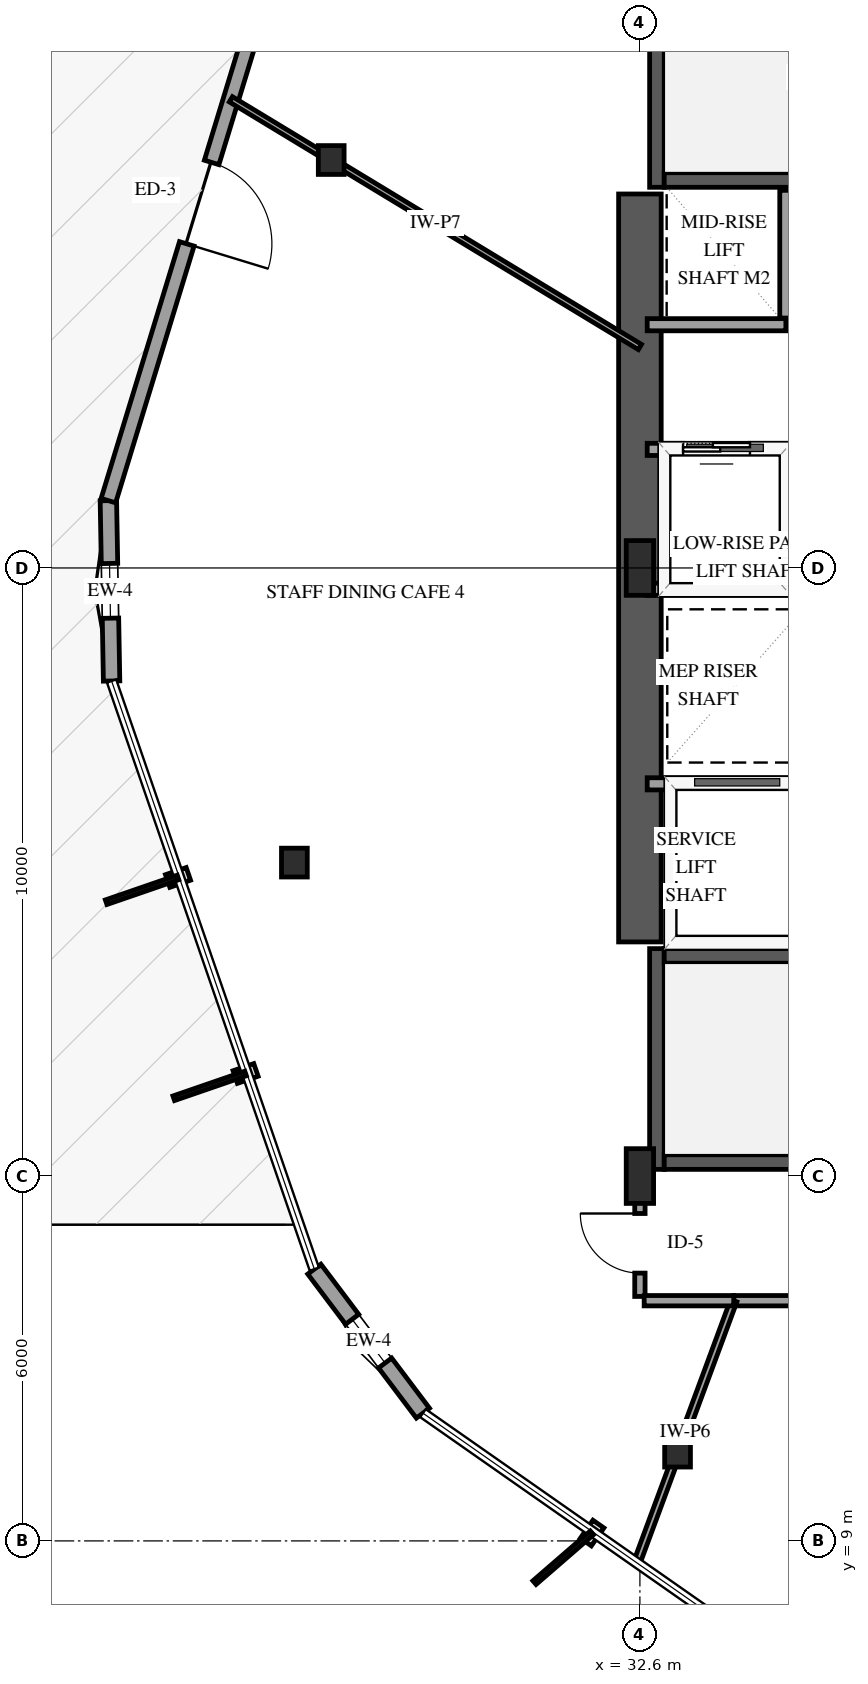
"""IFC4 building model, lengths in metres.
Left out: names, types, materials, properties, quantities, classifications, styles, units other than length and angle.
Written with IfcOpenShell. Run it as: python <this file> out.ifc"""

import sys

from ifc_helpers import new_model, si_unit, direction, frame, frame_2d, origin, origin_2d, place, context, subcontext, project, spatial, rectangle, i_section, extrude, element, fill, save


model = new_model("IFC4")
c1 = context("Model", 3, precision=1e-05, world=origin(), true_north=direction((0.0, 1.0)))
c2 = subcontext(c1, "Body", "Model", "MODEL_VIEW")
j1 = project(units=[si_unit("LENGTHUNIT", "METRE"), si_unit("PLANEANGLEUNIT", "RADIAN")], contexts=[c1])
p1 = place(None, origin())
s1 = spatial("IfcSite", under=j1, at=p1, CompositionType="ELEMENT")
p2 = place(p1, origin())
s2 = spatial("IfcBuilding", under=s1, at=p2, CompositionType="ELEMENT")
p3 = place(p2, frame((0.0, 0.0, 30.6)))
s3 = spatial("IfcBuildingStorey", under=s2, at=p3, CompositionType="ELEMENT", Elevation=30.6)
p4 = place(p3, frame((32.88, 15.11, 0.0), z_axis=(0.0, 0.0, 1.0), x_axis=(0.0, 1.0, 0.0)))
e1 = element("IfcWall", 1, at=p4, inside=s3, PredefinedType="SHEAR", context=c2, shape_type="SweptSolid", body=[
    extrude(rectangle(XDim=3.63, YDim=0.24, at=frame_2d((1.815, 0.0))), origin(), (0.0, 0.0, 1.0), 4.0),
])
for number, where, z_axis, x_axis in (
    (2, (33.0, 15.23, 0.0), (0.0, 0.0, 1.0), (1.0, 0.0, 0.0)),
    (3, (33.0, 18.62, 0.0), (0.0, 0.0, 1.0), (1.0, 0.0, 0.0)),
):
    element("IfcWall", number, at=place(p3, frame(where, z_axis=z_axis, x_axis=x_axis)), inside=s3, PredefinedType="SHEAR", context=c2, shape_type="SweptSolid", body=[
        extrude(rectangle(XDim=8.0, YDim=0.24, at=frame_2d((4.0, 0.0))), origin(), (0.0, 0.0, 1.0), 4.0),
    ])
p5 = place(p3, frame((32.88, 31.26, 0.0), z_axis=(0.0, 0.0, 1.0), x_axis=(0.0, 1.0, 0.0)))
e4 = element("IfcWall", 4, at=p5, inside=s3, PredefinedType="SHEAR", context=c2, shape_type="SweptSolid", body=[
    extrude(rectangle(XDim=3.63, YDim=0.24, at=frame_2d((1.815, 0.0))), origin(), (0.0, 0.0, 1.0), 4.0),
])
p6 = place(p3, frame((33.0, 31.38, 0.0), z_axis=(0.0, 0.0, 1.0), x_axis=(1.0, 0.0, 0.0)))
e5 = element("IfcWall", 5, at=p6, inside=s3, PredefinedType="SHEAR", context=c2, shape_type="SweptSolid", body=[
    extrude(rectangle(XDim=8.0, YDim=0.24, at=frame_2d((4.0, 0.0))), origin(), (0.0, 0.0, 1.0), 4.0),
])
p7 = place(p3, frame((32.6, 18.85, 0.0), z_axis=(0.0, 0.0, 1.0), x_axis=(0.0, 1.0, 0.0)))
e6 = element("IfcWall", 6, at=p7, inside=s3, PredefinedType="SHEAR", context=c2, shape_type="SweptSolid", body=[
    extrude(rectangle(XDim=12.3, YDim=0.7, at=frame_2d((6.15, 0.0))), origin(), (0.0, 0.0, 1.0), 4.0),
])
for number, where, z_axis, x_axis in (
    (7, (32.6, 15.0, -0.3), (0.0, 0.0, 1.0), (1.0, 0.0, 0.0)),
    (8, (32.6, 25.0, -0.3), (0.0, 0.0, 1.0), (1.0, 0.0, 0.0)),
):
    element("IfcColumn", number, at=place(p3, frame(where, z_axis=z_axis, x_axis=x_axis)), inside=s3, PredefinedType="PILASTER", context=c2, shape_type="SweptSolid", body=[
        extrude(rectangle(XDim=0.45, YDim=0.9, at=origin_2d()), origin(), (0.0, 0.0, 1.0), 4.3),
    ])
for number, where, z_axis, x_axis in (
    (9, (27.523, 31.708, -0.3), (0.0, 0.0, 1.0), (1.0, 0.0, 0.0)),
    (10, (26.918, 20.155, -0.3), (0.0, 0.0, 1.0), (1.0, 0.0, 0.0)),
    (11, (33.219, 10.452, -0.3), (0.0, 0.0, 1.0), (1.0, 0.0, 0.0)),
):
    element("IfcColumn", number, at=place(p3, frame(where, z_axis=z_axis, x_axis=x_axis)), inside=s3, PredefinedType="COLUMN", context=c2, shape_type="SweptSolid", body=[
        extrude(i_section(OverallWidth=0.424, OverallDepth=0.474, WebThickness=0.048, FlangeThickness=0.077, FilletRadius=0.038, at=origin_2d()), origin(), (0.0, 0.0, 1.0), 4.3),
    ])
p8 = place(p3, frame((23.859, 26.107, 0.0), z_axis=(0.0, 0.0, 1.0), x_axis=(0.017776431734, -0.999841986753, 0.0)))
e12 = element("IfcWall", 12, at=p8, inside=s3, PredefinedType="SOLIDWALL", context=c2, shape_type="SweptSolid", body=[
    extrude(rectangle(XDim=2.967, YDim=0.27, at=frame_2d((1.483, 0.0))), origin(), (0.0, 0.0, 1.0), 3.079),
])
p9 = place(p8, frame((1.033, 0.0, 0.75)))
e13 = element("IfcOpeningElement", 13, at=p9, cuts=e12, PredefinedType="OPENING", context=c2, shape_type="SweptSolid", body=[
    extrude(rectangle(XDim=0.9, YDim=1.5, at=frame_2d((0.45, 0.75))), frame((0.0, 0.145, 0.0), z_axis=(0.0, -1.0, 0.0), x_axis=(1.0, 0.0, 0.0)), (0.0, 0.0, 1.0), 0.29),
])
p10 = place(p3, frame((26.846, 35.891, 0.0), z_axis=(0.0, 0.0, 1.0), x_axis=(-0.292034213335, -0.956407872323, 0.0)))
e14 = element("IfcWall", 14, at=p10, inside=s3, PredefinedType="SOLIDWALL", context=c2, shape_type="SweptSolid", body=[
    extrude(rectangle(XDim=10.23, YDim=0.25, at=frame_2d((5.115, 0.0))), origin(), (0.0, 0.0, 1.0), 3.079),
])
p11 = place(p10, frame((4.415, 0.0, 0.0)))
e15 = element("IfcOpeningElement", 15, at=p11, cuts=e14, PredefinedType="OPENING", context=c2, shape_type="SweptSolid", body=[
    extrude(rectangle(XDim=1.4, YDim=2.2, at=frame_2d((0.7, 1.1))), frame((0.0, 0.135, 0.0), z_axis=(0.0, -1.0, 0.0), x_axis=(1.0, 0.0, 0.0)), (0.0, 0.0, 1.0), 0.27),
])
p12 = place(p3, frame((27.246, 13.469, 0.0), z_axis=(0.0, 0.0, 1.0), x_axis=(0.602130877059, -0.798397399102, 0.0)))
e16 = element("IfcWall", 16, at=p12, inside=s3, PredefinedType="SOLIDWALL", context=c2, shape_type="SweptSolid", body=[
    extrude(rectangle(XDim=2.967, YDim=0.27, at=frame_2d((1.483, 0.0))), origin(), (0.0, 0.0, 1.0), 3.079),
])
p13 = place(p12, frame((1.033, 0.0, 0.75)))
e17 = element("IfcOpeningElement", 17, at=p13, cuts=e16, PredefinedType="OPENING", context=c2, shape_type="SweptSolid", body=[
    extrude(rectangle(XDim=0.9, YDim=1.5, at=frame_2d((0.45, 0.75))), frame((0.0, 0.145, 0.0), z_axis=(0.0, -1.0, 0.0), x_axis=(1.0, 0.0, 0.0)), (0.0, 0.0, 1.0), 0.29),
])
p14 = place(p3, frame((32.72, 21.45, 0.0), z_axis=(0.0, 0.0, 1.0), x_axis=(1.0, 0.0, 0.0)))
e18 = element("IfcWall", 18, at=p14, inside=s3, PredefinedType="SOLIDWALL", context=c2, shape_type="SweptSolid", body=[
    extrude(rectangle(XDim=2.58, YDim=0.2, at=frame_2d((1.29, 0.0))), origin(), (0.0, 0.0, 1.0), 3.7),
])
p15 = place(p3, frame((32.72, 24.65, 0.0), z_axis=(0.0, 0.0, 1.0), x_axis=(1.0, 0.0, 0.0)))
e19 = element("IfcWall", 19, at=p15, inside=s3, PredefinedType="SOLIDWALL", context=c2, shape_type="SweptSolid", body=[
    extrude(rectangle(XDim=2.28, YDim=0.2, at=frame_2d((1.14, 0.0))), origin(), (0.0, 0.0, 1.0), 3.7),
])
p16 = place(p3, frame((32.72, 26.95, 0.0), z_axis=(0.0, 0.0, 1.0), x_axis=(1.0, 0.0, 0.0)))
e20 = element("IfcWall", 20, at=p16, inside=s3, PredefinedType="SOLIDWALL", context=c2, shape_type="SweptSolid", body=[
    extrude(rectangle(XDim=2.28, YDim=0.2, at=frame_2d((1.14, 0.0))), origin(), (0.0, 0.0, 1.0), 3.7),
])
p17 = place(p16, frame((0.59, 0.0, 0.0)))
e21 = element("IfcOpeningElement", 21, at=p17, cuts=e20, PredefinedType="OPENING", context=c2, shape_type="SweptSolid", body=[
    extrude(rectangle(XDim=1.1, YDim=2.15, at=frame_2d((0.55, 1.075))), frame((0.0, 0.11, 0.0), z_axis=(0.0, -1.0, 0.0), x_axis=(1.0, 0.0, 0.0)), (0.0, 0.0, 1.0), 0.22),
])
p18 = place(p3, frame((35.0, 24.76, 0.0), z_axis=(0.0, 0.0, 1.0), x_axis=(0.0, 1.0, 0.0)))
e22 = element("IfcWall", 22, at=p18, inside=s3, PredefinedType="SOLIDWALL", context=c2, shape_type="SweptSolid", body=[
    extrude(rectangle(XDim=2.08, YDim=0.2, at=frame_2d((1.04, 0.0))), origin(), (0.0, 0.0, 1.0), 3.7),
])
p19 = place(p3, frame((32.72, 29.0, 0.0), z_axis=(0.0, 0.0, 1.0), x_axis=(1.0, 0.0, 0.0)))
e23 = element("IfcWall", 23, at=p19, inside=s3, PredefinedType="SOLIDWALL", context=c2, shape_type="SweptSolid", body=[
    extrude(rectangle(XDim=2.28, YDim=0.2, at=frame_2d((1.14, 0.0))), origin(), (0.0, 0.0, 1.0), 3.7),
])
p20 = place(p3, frame((35.0, 29.11, 0.0), z_axis=(0.0, 0.0, 1.0), x_axis=(0.0, 1.0, 0.0)))
e24 = element("IfcWall", 24, at=p20, inside=s3, PredefinedType="SOLIDWALL", context=c2, shape_type="SweptSolid", body=[
    extrude(rectangle(XDim=2.1, YDim=0.2, at=frame_2d((1.05, 0.0))), origin(), (0.0, 0.0, 1.0), 3.7),
])
p21 = place(p3, frame((42.094, 12.95, 0.0), z_axis=(0.0, 0.0, 1.0), x_axis=(-1.0, 0.0, 0.0)))
e25 = element("IfcWall", 25, at=p21, inside=s3, PredefinedType="PARTITIONING", context=c2, shape_type="SweptSolid", body=[
    extrude(rectangle(XDim=7.951, YDim=0.17, at=frame_2d((3.976, 0.0))), origin(), (0.0, 0.0, 1.0), 3.7),
])
p22 = place(p21, frame((3.501, 0.0, 0.0)))
e26 = element("IfcOpeningElement", 26, at=p22, cuts=e25, PredefinedType="OPENING", context=c2, shape_type="SweptSolid", body=[
    extrude(rectangle(XDim=0.98, YDim=2.15, at=frame_2d((0.49, 1.075))), frame((0.0, 0.095, 0.0), z_axis=(0.0, -1.0, 0.0), x_axis=(1.0, 0.0, 0.0)), (0.0, 0.0, 1.0), 0.19),
])
p23 = place(p3, frame((32.6, 28.634, 0.0), z_axis=(0.0, 0.0, 1.0), x_axis=(-0.855390028233, 0.517984458839, 0.0)))
e27 = element("IfcWall", 27, at=p23, inside=s3, PredefinedType="PARTITIONING", context=c2, shape_type="SweptSolid", body=[
    extrude(rectangle(XDim=7.863, YDim=0.1, at=frame_2d((3.932, 0.0))), origin(), (0.0, 0.0, 1.0), 3.074),
])
p24 = place(p3, frame((34.143, 12.95, 0.0), z_axis=(0.0, 0.0, 1.0), x_axis=(-0.3470565426, -0.937844206805, 0.0)))
e28 = element("IfcWall", 28, at=p24, inside=s3, PredefinedType="PARTITIONING", context=c2, shape_type="SweptSolid", body=[
    extrude(rectangle(XDim=4.596, YDim=0.11, at=frame_2d((2.298, 0.0))), origin(), (0.0, 0.0, 1.0), 2.995),
])
p25 = place(p3, frame((32.6, 13.02, 0.0), z_axis=(0.0, 0.0, 1.0), x_axis=(0.0, 1.0, 0.0)))
e29 = element("IfcWall", 29, at=p25, inside=s3, PredefinedType="PARTITIONING", context=c2, shape_type="SweptSolid", body=[
    extrude(rectangle(XDim=1.91, YDim=0.17, at=frame_2d((0.955, 0.0))), origin(), (0.0, 0.0, 1.0), 3.7),
])
p26 = place(p25, frame((0.384, 0.0, 0.0)))
e30 = element("IfcOpeningElement", 30, at=p26, cuts=e29, PredefinedType="OPENING", context=c2, shape_type="SweptSolid", body=[
    extrude(rectangle(XDim=0.98, YDim=2.15, at=frame_2d((0.49, 1.075))), frame((0.0, 0.095, 0.0), z_axis=(0.0, -1.0, 0.0), x_axis=(1.0, 0.0, 0.0)), (0.0, 0.0, 1.0), 0.19),
])
p27 = place(p3, frame((34.143, 12.95, 0.0), z_axis=(0.0, 0.0, 1.0), x_axis=(-1.0, 0.0, 0.0)))
e31 = element("IfcWall", 31, at=p27, inside=s3, PredefinedType="PARTITIONING", context=c2, shape_type="SweptSolid", body=[
    extrude(rectangle(XDim=1.473, YDim=0.17, at=frame_2d((0.737, 0.0))), origin(), (0.0, 0.0, 1.0), 3.7),
])
p28 = place(p9, origin())
e32 = element("IfcWindow", 32, at=p28, inside=s3, PartitioningType="SINGLE_PANEL", PredefinedType="WINDOW", context=c2, shape_type="SweptSolid", body=[
    extrude(rectangle(XDim=0.9, YDim=1.5, at=frame_2d((0.45, 0.75))), frame((0.0, 0.03, 0.0), z_axis=(0.0, -1.0, 0.0), x_axis=(1.0, 0.0, 0.0)), (0.0, 0.0, 1.0), 0.06),
])
fill(e13, e32)
p29 = place(p11, origin())
e33 = element("IfcDoor", 33, at=p29, inside=s3, OperationType="SINGLE_SWING_RIGHT", PredefinedType="DOOR", context=c2, shape_type="SweptSolid", body=[
    extrude(rectangle(XDim=1.4, YDim=2.2, at=frame_2d((0.7, 1.1))), frame((0.0, 0.025, 0.0), z_axis=(0.0, -1.0, 0.0), x_axis=(1.0, 0.0, 0.0)), (0.0, 0.0, 1.0), 0.05),
])
fill(e15, e33)
p30 = place(p13, origin())
e34 = element("IfcWindow", 34, at=p30, inside=s3, PartitioningType="SINGLE_PANEL", PredefinedType="WINDOW", context=c2, shape_type="SweptSolid", body=[
    extrude(rectangle(XDim=0.9, YDim=1.5, at=frame_2d((0.45, 0.75))), frame((0.0, 0.03, 0.0), z_axis=(0.0, -1.0, 0.0), x_axis=(1.0, 0.0, 0.0)), (0.0, 0.0, 1.0), 0.06),
])
fill(e17, e34)
p31 = place(p17, origin())
e35 = element("IfcDoor", 35, at=p31, inside=s3, OperationType="SLIDING_TO_LEFT", PredefinedType="DOOR", context=c2, shape_type="SweptSolid", body=[
    extrude(rectangle(XDim=1.1, YDim=2.15, at=frame_2d((0.55, 1.075))), frame((0.0, 0.025, 0.0), z_axis=(0.0, -1.0, 0.0), x_axis=(1.0, 0.0, 0.0)), (0.0, 0.0, 1.0), 0.05),
])
fill(e21, e35)
p32 = place(p26, origin())
e36 = element("IfcDoor", 36, at=p32, inside=s3, OperationType="SINGLE_SWING_RIGHT", PredefinedType="DOOR", context=c2, shape_type="SweptSolid", body=[
    extrude(rectangle(XDim=0.98, YDim=2.15, at=frame_2d((0.49, 1.075))), frame((0.0, 0.025, 0.0), z_axis=(0.0, -1.0, 0.0), x_axis=(1.0, 0.0, 0.0)), (0.0, 0.0, 1.0), 0.05),
])
fill(e30, e36)
save(model, sys.argv[1])
